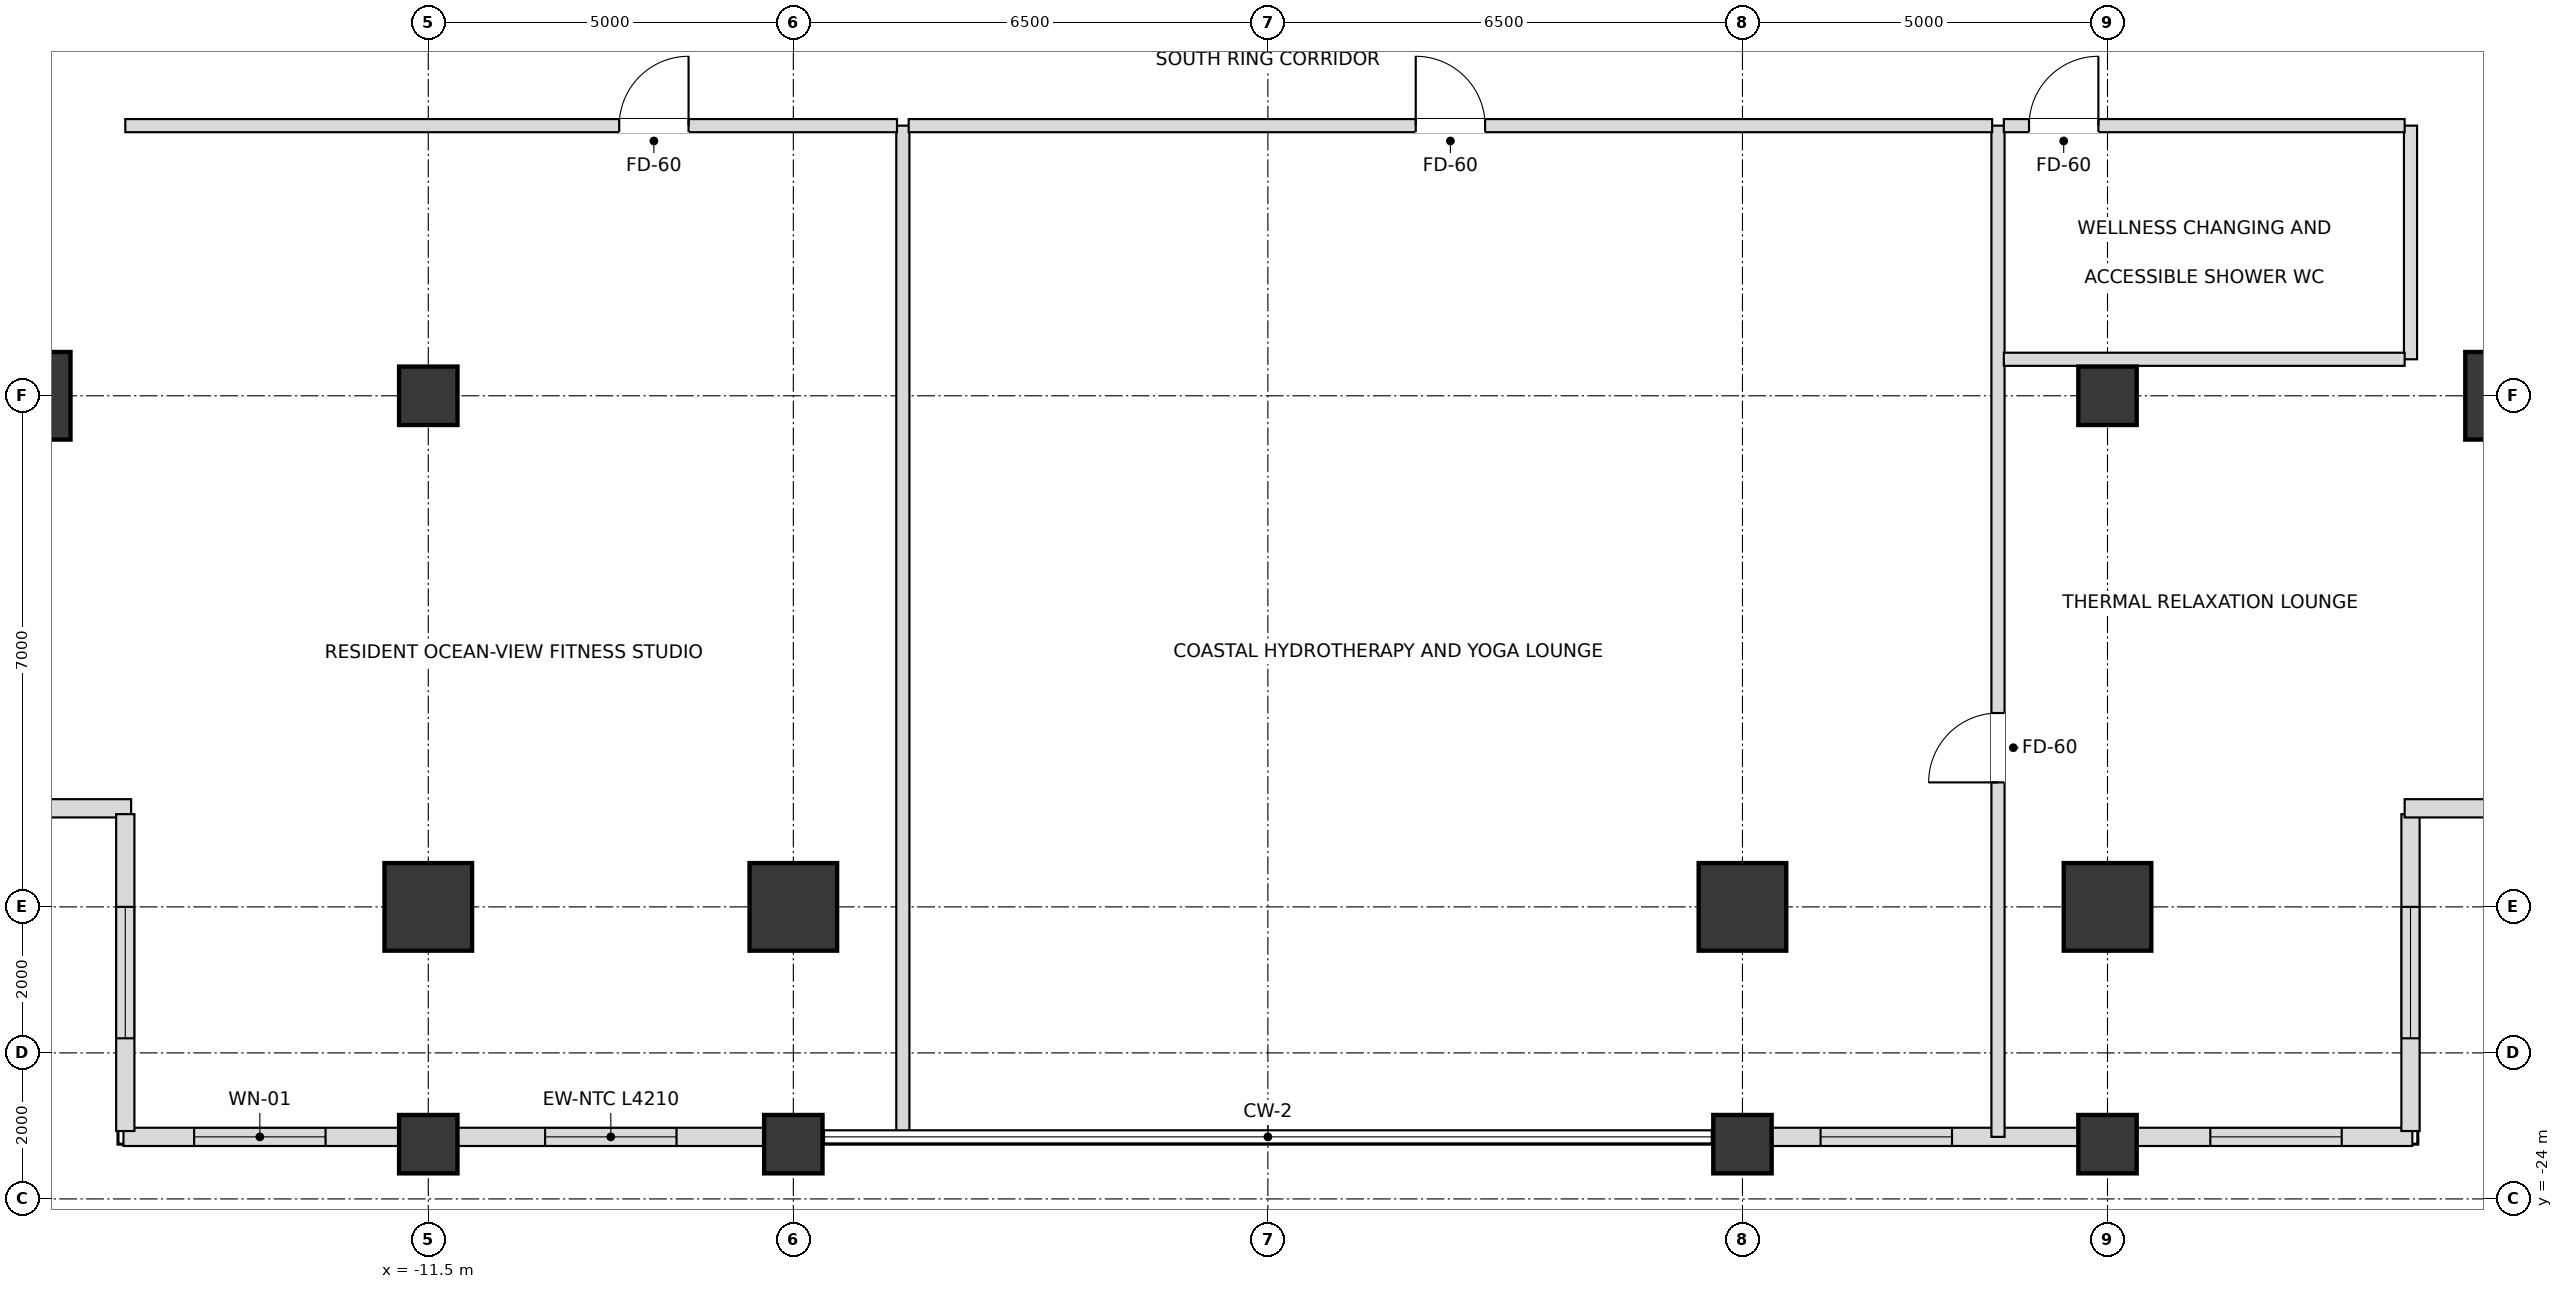
"""IFC4 building model, lengths in metres.
Left out: names, types, materials, properties, quantities, classifications, styles, units other than length and angle.
Written with IfcOpenShell. Run it as: python <this file> out.ifc"""

import sys

from ifc_helpers import new_model, si_unit, direction, frame, frame_2d, origin, origin_2d, place, context, subcontext, project, spatial, rectangle, extrude, element, fill, save


model = new_model("IFC4")
c1 = context("Model", 3, precision=1e-05, world=origin(), true_north=direction((0.0, 1.0)))
c2 = subcontext(c1, "Body", "Model", "MODEL_VIEW")
j1 = project(units=[si_unit("LENGTHUNIT", "METRE"), si_unit("PLANEANGLEUNIT", "RADIAN")], contexts=[c1])
p1 = place(None, origin())
s1 = spatial("IfcSite", under=j1, at=p1, CompositionType="ELEMENT")
p2 = place(p1, origin())
s2 = spatial("IfcBuilding", under=s1, at=p2, CompositionType="ELEMENT")
p3 = place(p2, frame((0.0, 0.0, 113.4)))
s3 = spatial("IfcBuildingStorey", under=s2, at=p3, CompositionType="ELEMENT", Elevation=113.4)
for number, where, z_axis, x_axis in (
    (1, (-11.5, -20.0, 0.0), (0.0, 0.0, 1.0), (1.0, 0.0, 0.0)),
    (2, (-6.5, -20.0, 0.0), (0.0, 0.0, 1.0), (1.0, 0.0, 0.0)),
    (3, (6.5, -20.0, 0.0), (0.0, 0.0, 1.0), (1.0, 0.0, 0.0)),
    (4, (11.5, -20.0, 0.0), (0.0, 0.0, 1.0), (1.0, 0.0, 0.0)),
    (5, (17.0, -13.0, 0.0), (0.0, 0.0, 1.0), (1.0, 0.0, 0.0)),
    (6, (-17.0, -13.0, 0.0), (0.0, 0.0, 1.0), (1.0, 0.0, 0.0)),
):
    element("IfcColumn", number, at=place(p3, frame(where, z_axis=z_axis, x_axis=x_axis)), inside=s3, PredefinedType="USERDEFINED", context=c2, shape_type="SweptSolid", body=[
        extrude(rectangle(XDim=1.2, YDim=1.2, at=origin_2d()), origin(), (0.0, 0.0, 1.0), 3.6),
    ])
for number, where, z_axis, x_axis in (
    (7, (-11.5, -13.0, 0.0), (0.0, 0.0, 1.0), (1.0, 0.0, 0.0)),
    (8, (11.5, -13.0, 0.0), (0.0, 0.0, 1.0), (1.0, 0.0, 0.0)),
    (9, (-11.5, -23.25, 0.0), (0.0, 0.0, 1.0), (1.0, 0.0, 0.0)),
    (10, (-6.5, -23.25, 0.0), (0.0, 0.0, 1.0), (1.0, 0.0, 0.0)),
    (11, (6.5, -23.25, 0.0), (0.0, 0.0, 1.0), (1.0, 0.0, 0.0)),
    (12, (11.5, -23.25, 0.0), (0.0, 0.0, 1.0), (1.0, 0.0, 0.0)),
):
    element("IfcColumn", number, at=place(p3, frame(where, z_axis=z_axis, x_axis=x_axis)), inside=s3, PredefinedType="COLUMN", context=c2, shape_type="SweptSolid", body=[
        extrude(rectangle(XDim=0.8, YDim=0.8, at=origin_2d()), origin(), (0.0, 0.0, 1.0), 3.6),
    ])
p4 = place(p3, frame((-15.675, -23.15, 0.0), z_axis=(0.0, 0.0, 1.0), x_axis=(1.0, 0.0, 0.0)))
e13 = element("IfcWall", 13, at=p4, inside=s3, PredefinedType="SOLIDWALL", context=c2, shape_type="SweptSolid", body=[
    extrude(rectangle(XDim=3.78, YDim=0.25, at=frame_2d((1.89, 0.0))), origin(), (0.0, 0.0, 1.0), 2.736),
])
p5 = place(p4, frame((0.968, 0.0, 0.72)))
e14 = element("IfcOpeningElement", 14, at=p5, cuts=e13, PredefinedType="OPENING", context=c2, shape_type="SweptSolid", body=[
    extrude(rectangle(XDim=1.8, YDim=1.68, at=frame_2d((0.9, 0.84))), frame((0.0, 0.135, 0.0), z_axis=(0.0, -1.0, 0.0), x_axis=(1.0, 0.0, 0.0)), (0.0, 0.0, 1.0), 0.27),
])
p6 = place(p3, frame((-11.105, -23.15, 0.0), z_axis=(0.0, 0.0, 1.0), x_axis=(1.0, 0.0, 0.0)))
e15 = element("IfcWall", 15, at=p6, inside=s3, PredefinedType="SOLIDWALL", context=c2, shape_type="SweptSolid", body=[
    extrude(rectangle(XDim=4.21, YDim=0.25, at=frame_2d((2.105, 0.0))), origin(), (0.0, 0.0, 1.0), 2.736),
])
p7 = place(p6, frame((1.205, 0.0, 0.72)))
e16 = element("IfcOpeningElement", 16, at=p7, cuts=e15, PredefinedType="OPENING", context=c2, shape_type="SweptSolid", body=[
    extrude(rectangle(XDim=1.8, YDim=1.68, at=frame_2d((0.9, 0.84))), frame((0.0, 0.135, 0.0), z_axis=(0.0, -1.0, 0.0), x_axis=(1.0, 0.0, 0.0)), (0.0, 0.0, 1.0), 0.27),
])
p8 = place(p3, frame((6.895, -23.15, 0.0), z_axis=(0.0, 0.0, 1.0), x_axis=(1.0, 0.0, 0.0)))
e17 = element("IfcWall", 17, at=p8, inside=s3, PredefinedType="SOLIDWALL", context=c2, shape_type="SweptSolid", body=[
    extrude(rectangle(XDim=4.21, YDim=0.25, at=frame_2d((2.105, 0.0))), origin(), (0.0, 0.0, 1.0), 2.736),
])
p9 = place(p8, frame((0.675, 0.0, 0.72)))
e18 = element("IfcOpeningElement", 18, at=p9, cuts=e17, PredefinedType="OPENING", context=c2, shape_type="SweptSolid", body=[
    extrude(rectangle(XDim=1.8, YDim=1.68, at=frame_2d((0.9, 0.84))), frame((0.0, 0.135, 0.0), z_axis=(0.0, -1.0, 0.0), x_axis=(1.0, 0.0, 0.0)), (0.0, 0.0, 1.0), 0.27),
])
p10 = place(p3, frame((11.895, -23.15, 0.0), z_axis=(0.0, 0.0, 1.0), x_axis=(1.0, 0.0, 0.0)))
e19 = element("IfcWall", 19, at=p10, inside=s3, PredefinedType="SOLIDWALL", context=c2, shape_type="SweptSolid", body=[
    extrude(rectangle(XDim=3.78, YDim=0.25, at=frame_2d((1.89, 0.0))), origin(), (0.0, 0.0, 1.0), 2.736),
])
p11 = place(p10, frame((1.013, 0.0, 0.72)))
e20 = element("IfcOpeningElement", 20, at=p11, cuts=e19, PredefinedType="OPENING", context=c2, shape_type="SweptSolid", body=[
    extrude(rectangle(XDim=1.8, YDim=1.68, at=frame_2d((0.9, 0.84))), frame((0.0, 0.135, 0.0), z_axis=(0.0, -1.0, 0.0), x_axis=(1.0, 0.0, 0.0)), (0.0, 0.0, 1.0), 0.27),
])
p12 = place(p3, frame((-20.23, -18.65, 0.0), z_axis=(0.0, 0.0, 1.0), x_axis=(1.0, 0.0, 0.0)))
e21 = element("IfcWall", 21, at=p12, inside=s3, PredefinedType="SOLIDWALL", context=c2, shape_type="SweptSolid", body=[
    extrude(rectangle(XDim=4.66, YDim=0.25, at=frame_2d((2.33, 0.0))), origin(), (0.0, 0.0, 1.0), 2.736),
])
p13 = place(p12, frame((1.43, 0.0, 0.72)))
e22 = element("IfcOpeningElement", 22, at=p13, cuts=e21, PredefinedType="OPENING", context=c2, shape_type="SweptSolid", body=[
    extrude(rectangle(XDim=1.8, YDim=1.68, at=frame_2d((0.9, 0.84))), frame((0.0, 0.135, 0.0), z_axis=(0.0, -1.0, 0.0), x_axis=(1.0, 0.0, 0.0)), (0.0, 0.0, 1.0), 0.27),
])
p14 = place(p3, frame((-15.65, -18.73, 0.0), z_axis=(0.0, 0.0, 1.0), x_axis=(0.0, -1.0, 0.0)))
e23 = element("IfcWall", 23, at=p14, inside=s3, PredefinedType="SOLIDWALL", context=c2, shape_type="SweptSolid", body=[
    extrude(rectangle(XDim=4.34, YDim=0.25, at=frame_2d((2.17, 0.0))), origin(), (0.0, 0.0, 1.0), 2.736),
])
p15 = place(p14, frame((1.27, 0.0, 0.72)))
e24 = element("IfcOpeningElement", 24, at=p15, cuts=e23, PredefinedType="OPENING", context=c2, shape_type="SweptSolid", body=[
    extrude(rectangle(XDim=1.8, YDim=1.68, at=frame_2d((0.9, 0.84))), frame((0.0, 0.135, 0.0), z_axis=(0.0, -1.0, 0.0), x_axis=(1.0, 0.0, 0.0)), (0.0, 0.0, 1.0), 0.27),
])
p16 = place(p3, frame((15.65, -23.07, 0.0), z_axis=(0.0, 0.0, 1.0), x_axis=(0.0, 1.0, 0.0)))
e25 = element("IfcWall", 25, at=p16, inside=s3, PredefinedType="SOLIDWALL", context=c2, shape_type="SweptSolid", body=[
    extrude(rectangle(XDim=4.34, YDim=0.25, at=frame_2d((2.17, 0.0))), origin(), (0.0, 0.0, 1.0), 2.736),
])
p17 = place(p16, frame((1.27, 0.0, 0.72)))
e26 = element("IfcOpeningElement", 26, at=p17, cuts=e25, PredefinedType="OPENING", context=c2, shape_type="SweptSolid", body=[
    extrude(rectangle(XDim=1.8, YDim=1.68, at=frame_2d((0.9, 0.84))), frame((0.0, 0.135, 0.0), z_axis=(0.0, -1.0, 0.0), x_axis=(1.0, 0.0, 0.0)), (0.0, 0.0, 1.0), 0.27),
])
p18 = place(p3, frame((15.57, -18.65, 0.0), z_axis=(0.0, 0.0, 1.0), x_axis=(1.0, 0.0, 0.0)))
e27 = element("IfcWall", 27, at=p18, inside=s3, PredefinedType="SOLIDWALL", context=c2, shape_type="SweptSolid", body=[
    extrude(rectangle(XDim=4.66, YDim=0.25, at=frame_2d((2.33, 0.0))), origin(), (0.0, 0.0, 1.0), 2.736),
])
p19 = place(p18, frame((1.43, 0.0, 0.72)))
e28 = element("IfcOpeningElement", 28, at=p19, cuts=e27, PredefinedType="OPENING", context=c2, shape_type="SweptSolid", body=[
    extrude(rectangle(XDim=1.8, YDim=1.68, at=frame_2d((0.9, 0.84))), frame((0.0, 0.135, 0.0), z_axis=(0.0, -1.0, 0.0), x_axis=(1.0, 0.0, 0.0)), (0.0, 0.0, 1.0), 0.27),
])
p20 = place(p3, frame((-5.0, -23.15, 0.0), z_axis=(0.0, 0.0, 1.0), x_axis=(0.0, 1.0, 0.0)))
e29 = element("IfcWall", 29, at=p20, inside=s3, PredefinedType="PARTITIONING", context=c2, shape_type="SweptSolid", body=[
    extrude(rectangle(XDim=13.85, YDim=0.18, at=frame_2d((6.925, 0.0))), origin(), (0.0, 0.0, 1.0), 2.816),
])
p21 = place(p3, frame((10.0, -23.15, 0.0), z_axis=(0.0, 0.0, 1.0), x_axis=(0.0, 1.0, 0.0)))
e30 = element("IfcWall", 30, at=p21, inside=s3, PredefinedType="PARTITIONING", context=c2, shape_type="SweptSolid", body=[
    extrude(rectangle(XDim=13.85, YDim=0.18, at=frame_2d((6.925, 0.0))), origin(), (0.0, 0.0, 1.0), 2.816),
])
p22 = place(p21, frame((4.855, 0.0, 0.0)))
e31 = element("IfcOpeningElement", 31, at=p22, cuts=e30, PredefinedType="OPENING", context=c2, shape_type="SweptSolid", body=[
    extrude(rectangle(XDim=0.95, YDim=2.15, at=frame_2d((0.475, 1.075))), frame((0.0, 0.1, 0.0), z_axis=(0.0, -1.0, 0.0), x_axis=(1.0, 0.0, 0.0)), (0.0, 0.0, 1.0), 0.2),
])
p23 = place(p3, frame((15.65, -12.5, 0.0), z_axis=(0.0, 0.0, 1.0), x_axis=(0.0, 1.0, 0.0)))
e32 = element("IfcWall", 32, at=p23, inside=s3, PredefinedType="PARTITIONING", context=c2, shape_type="SweptSolid", body=[
    extrude(rectangle(XDim=3.2, YDim=0.18, at=frame_2d((1.6, 0.0))), origin(), (0.0, 0.0, 1.0), 3.38),
])
p24 = place(p3, frame((10.08, -12.5, 0.0), z_axis=(0.0, 0.0, 1.0), x_axis=(1.0, 0.0, 0.0)))
e33 = element("IfcWall", 33, at=p24, inside=s3, PredefinedType="PARTITIONING", context=c2, shape_type="SweptSolid", body=[
    extrude(rectangle(XDim=5.49, YDim=0.18, at=frame_2d((2.745, 0.0))), origin(), (0.0, 0.0, 1.0), 3.38),
])
p25 = place(p3, frame((-15.65, -9.3, 0.0), z_axis=(0.0, 0.0, 1.0), x_axis=(1.0, 0.0, 0.0)))
e34 = element("IfcWall", 34, at=p25, inside=s3, PredefinedType="PARTITIONING", context=c2, shape_type="SweptSolid", body=[
    extrude(rectangle(XDim=10.57, YDim=0.18, at=frame_2d((5.285, 0.0))), origin(), (0.0, 0.0, 1.0), 2.816),
])
p26 = place(p25, frame((6.765, 0.0, 0.0)))
e35 = element("IfcOpeningElement", 35, at=p26, cuts=e34, PredefinedType="OPENING", context=c2, shape_type="SweptSolid", body=[
    extrude(rectangle(XDim=0.95, YDim=2.15, at=frame_2d((0.475, 1.075))), frame((0.0, 0.1, 0.0), z_axis=(0.0, -1.0, 0.0), x_axis=(1.0, 0.0, 0.0)), (0.0, 0.0, 1.0), 0.2),
])
p27 = place(p3, frame((-4.92, -9.3, 0.0), z_axis=(0.0, 0.0, 1.0), x_axis=(1.0, 0.0, 0.0)))
e36 = element("IfcWall", 36, at=p27, inside=s3, PredefinedType="PARTITIONING", context=c2, shape_type="SweptSolid", body=[
    extrude(rectangle(XDim=14.84, YDim=0.18, at=frame_2d((7.42, 0.0))), origin(), (0.0, 0.0, 1.0), 2.816),
])
p28 = place(p27, frame((6.945, 0.0, 0.0)))
e37 = element("IfcOpeningElement", 37, at=p28, cuts=e36, PredefinedType="OPENING", context=c2, shape_type="SweptSolid", body=[
    extrude(rectangle(XDim=0.95, YDim=2.15, at=frame_2d((0.475, 1.075))), frame((0.0, 0.1, 0.0), z_axis=(0.0, -1.0, 0.0), x_axis=(1.0, 0.0, 0.0)), (0.0, 0.0, 1.0), 0.2),
])
p29 = place(p3, frame((10.08, -9.3, 0.0), z_axis=(0.0, 0.0, 1.0), x_axis=(1.0, 0.0, 0.0)))
e38 = element("IfcWall", 38, at=p29, inside=s3, PredefinedType="PARTITIONING", context=c2, shape_type="SweptSolid", body=[
    extrude(rectangle(XDim=5.49, YDim=0.18, at=frame_2d((2.745, 0.0))), origin(), (0.0, 0.0, 1.0), 3.38),
])
p30 = place(p29, frame((0.345, 0.0, 0.0)))
e39 = element("IfcOpeningElement", 39, at=p30, cuts=e38, PredefinedType="OPENING", context=c2, shape_type="SweptSolid", body=[
    extrude(rectangle(XDim=0.95, YDim=2.15, at=frame_2d((0.475, 1.075))), frame((0.0, 0.1, 0.0), z_axis=(0.0, -1.0, 0.0), x_axis=(1.0, 0.0, 0.0)), (0.0, 0.0, 1.0), 0.2),
])
p31 = place(p5, origin())
e40 = element("IfcWindow", 40, at=p31, inside=s3, PartitioningType="SINGLE_PANEL", PredefinedType="WINDOW", context=c2, shape_type="SweptSolid", body=[
    extrude(rectangle(XDim=1.8, YDim=1.68, at=frame_2d((0.9, 0.84))), frame((0.0, 0.03, 0.0), z_axis=(0.0, -1.0, 0.0), x_axis=(1.0, 0.0, 0.0)), (0.0, 0.0, 1.0), 0.06),
])
fill(e14, e40)
p32 = place(p7, origin())
e41 = element("IfcWindow", 41, at=p32, inside=s3, PartitioningType="SINGLE_PANEL", PredefinedType="WINDOW", context=c2, shape_type="SweptSolid", body=[
    extrude(rectangle(XDim=1.8, YDim=1.68, at=frame_2d((0.9, 0.84))), frame((0.0, 0.03, 0.0), z_axis=(0.0, -1.0, 0.0), x_axis=(1.0, 0.0, 0.0)), (0.0, 0.0, 1.0), 0.06),
])
fill(e16, e41)
p33 = place(p9, origin())
e42 = element("IfcWindow", 42, at=p33, inside=s3, PartitioningType="SINGLE_PANEL", PredefinedType="WINDOW", context=c2, shape_type="SweptSolid", body=[
    extrude(rectangle(XDim=1.8, YDim=1.68, at=frame_2d((0.9, 0.84))), frame((0.0, 0.03, 0.0), z_axis=(0.0, -1.0, 0.0), x_axis=(1.0, 0.0, 0.0)), (0.0, 0.0, 1.0), 0.06),
])
fill(e18, e42)
p34 = place(p11, origin())
e43 = element("IfcWindow", 43, at=p34, inside=s3, PartitioningType="SINGLE_PANEL", PredefinedType="WINDOW", context=c2, shape_type="SweptSolid", body=[
    extrude(rectangle(XDim=1.8, YDim=1.68, at=frame_2d((0.9, 0.84))), frame((0.0, 0.03, 0.0), z_axis=(0.0, -1.0, 0.0), x_axis=(1.0, 0.0, 0.0)), (0.0, 0.0, 1.0), 0.06),
])
fill(e20, e43)
p35 = place(p15, origin())
e44 = element("IfcWindow", 44, at=p35, inside=s3, PartitioningType="SINGLE_PANEL", PredefinedType="WINDOW", context=c2, shape_type="SweptSolid", body=[
    extrude(rectangle(XDim=1.8, YDim=1.68, at=frame_2d((0.9, 0.84))), frame((0.0, 0.03, 0.0), z_axis=(0.0, -1.0, 0.0), x_axis=(1.0, 0.0, 0.0)), (0.0, 0.0, 1.0), 0.06),
])
fill(e24, e44)
p36 = place(p17, origin())
e45 = element("IfcWindow", 45, at=p36, inside=s3, PartitioningType="SINGLE_PANEL", PredefinedType="WINDOW", context=c2, shape_type="SweptSolid", body=[
    extrude(rectangle(XDim=1.8, YDim=1.68, at=frame_2d((0.9, 0.84))), frame((0.0, 0.03, 0.0), z_axis=(0.0, -1.0, 0.0), x_axis=(1.0, 0.0, 0.0)), (0.0, 0.0, 1.0), 0.06),
])
fill(e26, e45)
p37 = place(p30, origin())
e46 = element("IfcDoor", 46, at=p37, inside=s3, OperationType="SINGLE_SWING_RIGHT", PredefinedType="DOOR", context=c2, shape_type="SweptSolid", body=[
    extrude(rectangle(XDim=0.95, YDim=2.15, at=frame_2d((0.475, 1.075))), frame((0.0, 0.025, 0.0), z_axis=(0.0, -1.0, 0.0), x_axis=(1.0, 0.0, 0.0)), (0.0, 0.0, 1.0), 0.05),
])
fill(e39, e46)
p38 = place(p22, origin())
e47 = element("IfcDoor", 47, at=p38, inside=s3, OperationType="SINGLE_SWING_LEFT", PredefinedType="DOOR", context=c2, shape_type="SweptSolid", body=[
    extrude(rectangle(XDim=0.95, YDim=2.15, at=frame_2d((0.475, 1.075))), frame((0.0, 0.025, 0.0), z_axis=(0.0, -1.0, 0.0), x_axis=(1.0, 0.0, 0.0)), (0.0, 0.0, 1.0), 0.05),
])
fill(e31, e47)
p39 = place(p26, origin())
e48 = element("IfcDoor", 48, at=p39, inside=s3, OperationType="SINGLE_SWING_RIGHT", PredefinedType="DOOR", context=c2, shape_type="SweptSolid", body=[
    extrude(rectangle(XDim=0.95, YDim=2.15, at=frame_2d((0.475, 1.075))), frame((0.0, 0.025, 0.0), z_axis=(0.0, -1.0, 0.0), x_axis=(1.0, 0.0, 0.0)), (0.0, 0.0, 1.0), 0.05),
])
fill(e35, e48)
p40 = place(p28, origin())
e49 = element("IfcDoor", 49, at=p40, inside=s3, OperationType="SINGLE_SWING_LEFT", PredefinedType="DOOR", context=c2, shape_type="SweptSolid", body=[
    extrude(rectangle(XDim=0.95, YDim=2.15, at=frame_2d((0.475, 1.075))), frame((0.0, 0.025, 0.0), z_axis=(0.0, -1.0, 0.0), x_axis=(1.0, 0.0, 0.0)), (0.0, 0.0, 1.0), 0.05),
])
fill(e37, e49)
save(model, sys.argv[1])
